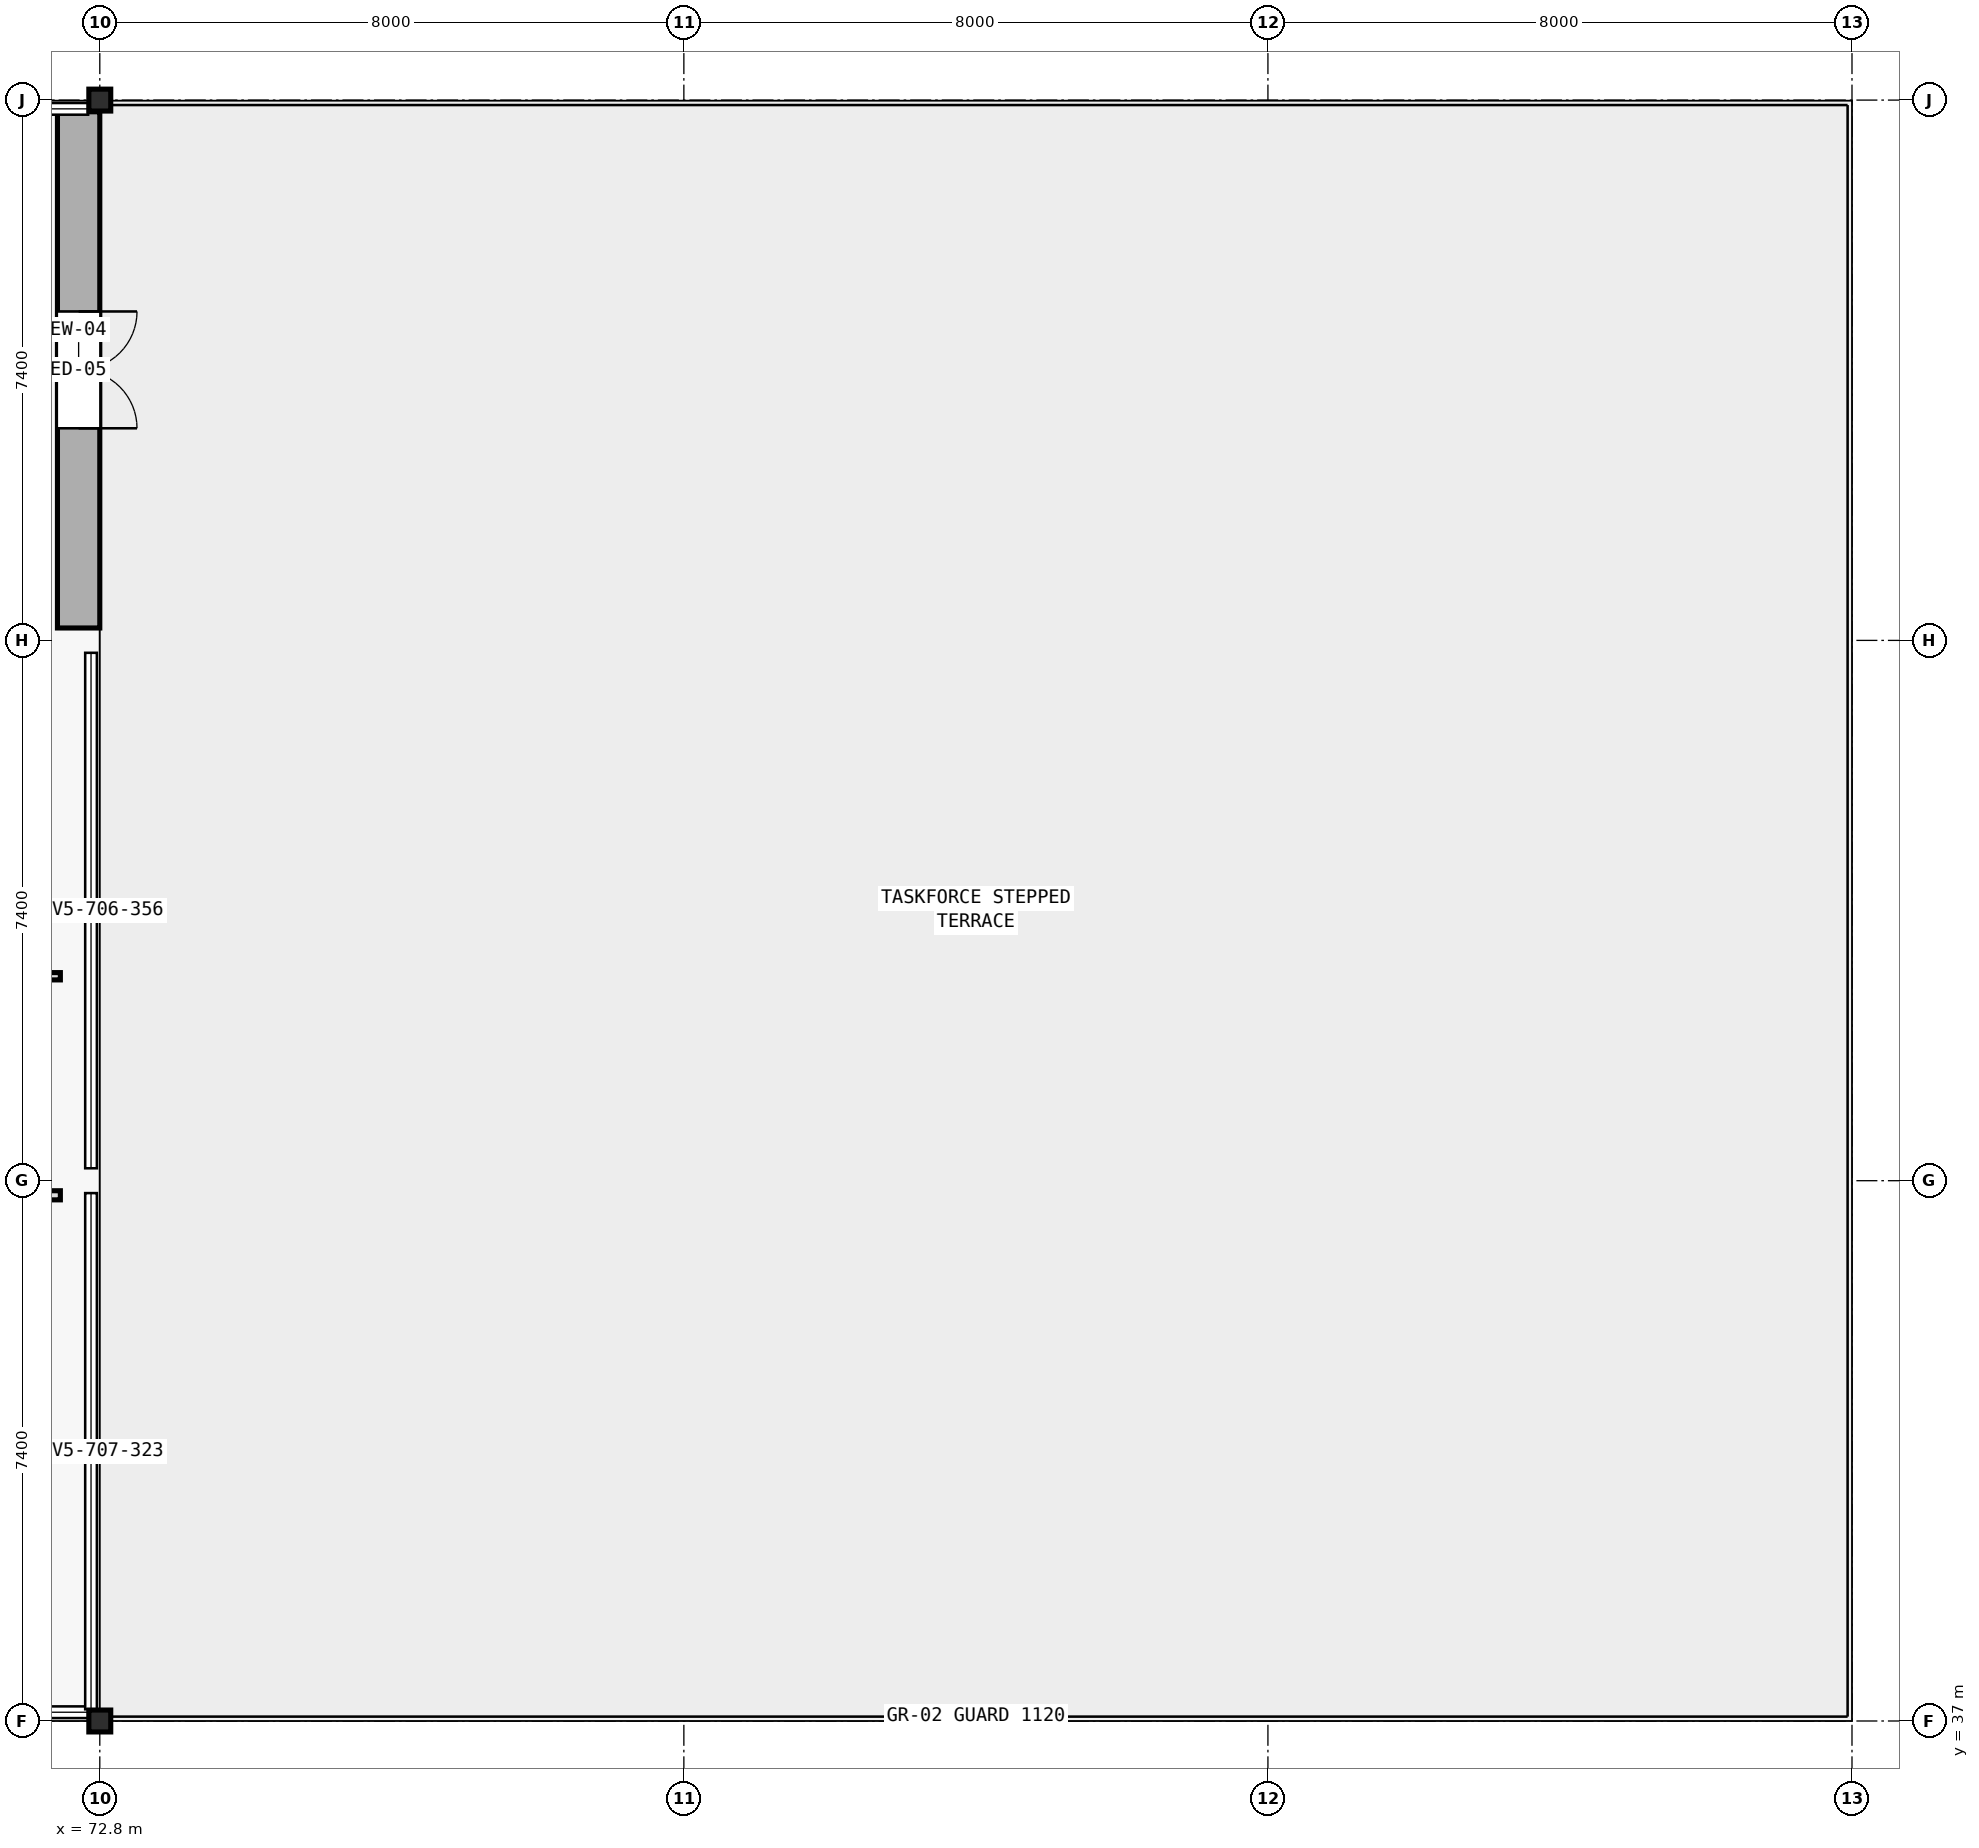
"""IFC4 building model, lengths in metres.
Left out: names, types, materials, properties, quantities, classifications, styles, units other than length and angle.
Written with IfcOpenShell. Run it as: python <this file> out.ifc"""

import sys

from ifc_helpers import new_model, si_unit, direction, frame, frame_2d, origin, origin_2d, place, context, subcontext, project, spatial, rectangle, i_section, extrude, element, fill, save


model = new_model("IFC4")
c1 = context("Model", 3, precision=1e-05, world=origin(), true_north=direction((0.0, 1.0)))
c2 = subcontext(c1, "Body", "Model", "MODEL_VIEW")
j1 = project(units=[si_unit("LENGTHUNIT", "METRE"), si_unit("PLANEANGLEUNIT", "RADIAN")], contexts=[c1])
p1 = place(None, origin())
s1 = spatial("IfcSite", under=j1, at=p1, CompositionType="ELEMENT")
p2 = place(p1, origin())
s2 = spatial("IfcBuilding", under=s1, at=p2, CompositionType="ELEMENT")
p3 = place(p2, frame((0.0, 0.0, 27.2)))
s3 = spatial("IfcBuildingStorey", under=s2, at=p3, CompositionType="ELEMENT", Elevation=27.2)
for number, where, z_axis, x_axis in (
    (1, (72.8, 37.0, 0.0), (0.0, 0.0, 1.0), (1.0, 0.0, 0.0)),
    (2, (72.8, 59.2, 0.0), (0.0, 0.0, 1.0), (1.0, 0.0, 0.0)),
):
    element("IfcColumn", number, at=place(p3, frame(where, z_axis=z_axis, x_axis=x_axis)), inside=s3, PredefinedType="COLUMN", context=c2, shape_type="SweptSolid", body=[
        extrude(i_section(OverallWidth=0.3, OverallDepth=0.3, WebThickness=0.011, FlangeThickness=0.019, FilletRadius=0.027, at=origin_2d()), origin(), (0.0, 0.0, 1.0), 3.9),
    ])
p4 = place(p3, frame((72.51, 59.04, 0.0), z_axis=(0.0, 0.0, 1.0), x_axis=(0.0, -1.0, 0.0)))
e3 = element("IfcWall", 3, at=p4, inside=s3, PredefinedType="STANDARD", context=c2, shape_type="SweptSolid", body=[
    extrude(rectangle(XDim=7.07, YDim=0.58, at=frame_2d((3.535, 0.0))), origin(), (0.0, 0.0, 1.0), 3.57),
])
p5 = place(p4, frame((2.735, 0.0, 0.0)))
e4 = element("IfcOpeningElement", 4, at=p5, cuts=e3, PredefinedType="OPENING", context=c2, shape_type="SweptSolid", body=[
    extrude(rectangle(XDim=1.6, YDim=2.3, at=frame_2d((0.8, 1.15))), frame((0.0, 0.3, 0.0), z_axis=(0.0, -1.0, 0.0), x_axis=(1.0, 0.0, 0.0)), (0.0, 0.0, 1.0), 0.6),
])
p6 = place(p3, frame((54.74, 44.2, 0.0), z_axis=(0.0, 0.0, 1.0), x_axis=(1.0, 0.0, 0.0)))
e5 = element("IfcWall", 5, at=p6, inside=s3, PredefinedType="PARTITIONING", context=c2, shape_type="SweptSolid", body=[
    extrude(rectangle(XDim=17.52, YDim=0.125, at=frame_2d((8.76, 0.0))), origin(), (0.0, 0.0, 1.0), 3.15),
])
p7 = place(p6, frame((8.21, 0.0, 0.0)))
e6 = element("IfcOpeningElement", 6, at=p7, cuts=e5, PredefinedType="OPENING", context=c2, shape_type="SweptSolid", body=[
    extrude(rectangle(XDim=1.1, YDim=2.2, at=frame_2d((0.55, 1.1))), frame((0.0, 0.073, 0.0), z_axis=(0.0, -1.0, 0.0), x_axis=(1.0, 0.0, 0.0)), (0.0, 0.0, 1.0), 0.145),
])
p8 = place(p3, frame((54.14, 47.2, 0.0), z_axis=(0.0, 0.0, 1.0), x_axis=(1.0, 0.0, 0.0)))
e7 = element("IfcWall", 7, at=p8, inside=s3, PredefinedType="PARTITIONING", context=c2, shape_type="SweptSolid", body=[
    extrude(rectangle(XDim=18.12, YDim=0.1, at=frame_2d((9.06, 0.0))), origin(), (0.0, 0.0, 1.0), 3.15),
])
p9 = place(p8, frame((8.36, 0.0, 0.0)))
e8 = element("IfcOpeningElement", 8, at=p9, cuts=e7, PredefinedType="OPENING", context=c2, shape_type="SweptSolid", body=[
    extrude(rectangle(XDim=1.4, YDim=2.2, at=frame_2d((0.7, 1.1))), frame((0.0, 0.06, 0.0), z_axis=(0.0, -1.0, 0.0), x_axis=(1.0, 0.0, 0.0)), (0.0, 0.0, 1.0), 0.12),
])
p10 = place(p5, origin())
e9 = element("IfcDoor", 9, at=p10, inside=s3, OperationType="DOUBLE_DOOR_SINGLE_SWING", PredefinedType="DOOR", context=c2, shape_type="SweptSolid", body=[
    extrude(rectangle(XDim=1.6, YDim=2.3, at=frame_2d((0.8, 1.15))), frame((0.0, 0.025, 0.0), z_axis=(0.0, -1.0, 0.0), x_axis=(1.0, 0.0, 0.0)), (0.0, 0.0, 1.0), 0.05),
])
fill(e4, e9)
save(model, sys.argv[1])
